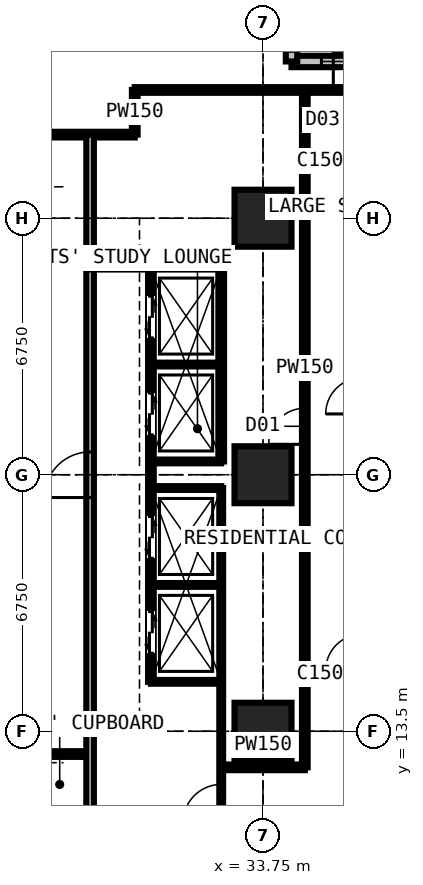
"""IFC4 building model, lengths in metres.
Left out: names, types, materials, properties, quantities, classifications, styles, units other than length and angle.
Written with IfcOpenShell. Run it as: python <this file> out.ifc"""

import sys

from ifc_helpers import new_model, si_unit, direction, frame, frame_2d, origin, origin_2d, place, context, subcontext, project, spatial, rectangle, extrude, element, fill, save


model = new_model("IFC4")
c1 = context("Model", 3, precision=1e-05, world=origin(), true_north=direction((0.0, 1.0)))
c2 = subcontext(c1, "Body", "Model", "MODEL_VIEW")
j1 = project(units=[si_unit("LENGTHUNIT", "METRE"), si_unit("PLANEANGLEUNIT", "RADIAN")], contexts=[c1])
p1 = place(None, origin())
s1 = spatial("IfcSite", under=j1, at=p1, CompositionType="ELEMENT")
p2 = place(p1, origin())
s2 = spatial("IfcBuilding", under=s1, at=p2, CompositionType="ELEMENT")
p3 = place(p2, frame((0.0, 0.0, 116.1)))
s3 = spatial("IfcBuildingStorey", under=s2, at=p3, CompositionType="ELEMENT", Elevation=116.1)
for number, where, z_axis, x_axis in (
    (1, (33.75, 13.5, 0.0), (0.0, 0.0, 1.0), (1.0, 0.0, 0.0)),
    (2, (33.75, 20.25, 0.0), (0.0, 0.0, 1.0), (1.0, 0.0, 0.0)),
    (3, (33.75, 27.0, 0.0), (0.0, 0.0, 1.0), (1.0, 0.0, 0.0)),
):
    element("IfcColumn", number, at=place(p3, frame(where, z_axis=z_axis, x_axis=x_axis)), inside=s3, PredefinedType="COLUMN", context=c2, shape_type="SweptSolid", body=[
        extrude(rectangle(XDim=1.5, YDim=1.5, at=origin_2d()), origin(), (0.0, 0.0, 1.0), 3.6),
    ])
p4 = place(p3, frame((37.875, 31.125, 0.0), z_axis=(0.0, 0.0, 1.0), x_axis=(-1.0, 0.0, 0.0)))
e4 = element("IfcWall", 4, at=p4, inside=s3, PredefinedType="SOLIDWALL", context=c2, shape_type="SweptSolid", body=[
    extrude(rectangle(XDim=3.375, YDim=0.3, at=frame_2d((1.688, 0.0))), origin(), (0.0, 0.0, 1.0), 3.375),
])
p5 = place(p4, frame((0.788, 0.0, 0.6)))
e5 = element("IfcOpeningElement", 5, at=p5, cuts=e4, PredefinedType="OPENING", context=c2, shape_type="SweptSolid", body=[
    extrude(rectangle(XDim=1.8, YDim=2.1, at=frame_2d((0.9, 1.05))), frame((0.0, 0.16, 0.0), z_axis=(0.0, -1.0, 0.0), x_axis=(1.0, 0.0, 0.0)), (0.0, 0.0, 1.0), 0.32),
])
p6 = place(p3, frame((34.5, 31.125, 0.0), z_axis=(0.0, 0.0, 1.0), x_axis=(0.0, 1.0, 0.0)))
e6 = element("IfcWall", 6, at=p6, inside=s3, PredefinedType="SOLIDWALL", context=c2, shape_type="SweptSolid", body=[
    extrude(rectangle(XDim=3.375, YDim=0.3, at=frame_2d((1.688, 0.0))), origin(), (0.0, 0.0, 1.0), 3.375),
])
p7 = place(p6, frame((0.268, 0.0, 0.9)))
e7 = element("IfcOpeningElement", 7, at=p7, cuts=e6, PredefinedType="OPENING", context=c2, shape_type="SweptSolid", body=[
    extrude(rectangle(XDim=1.5, YDim=1.8, at=frame_2d((0.75, 0.9))), frame((0.0, 0.16, 0.0), z_axis=(0.0, -1.0, 0.0), x_axis=(1.0, 0.0, 0.0)), (0.0, 0.0, 1.0), 0.32),
])
p8 = place(p3, frame((11.3, 29.2, 0.0), z_axis=(0.0, 0.0, 1.0), x_axis=(1.0, 0.0, 0.0)))
e8 = element("IfcWall", 8, at=p8, inside=s3, PredefinedType="PARTITIONING", context=c2, shape_type="SweptSolid", body=[
    extrude(rectangle(XDim=19.075, YDim=0.15, at=frame_2d((9.538, 0.0))), origin(), (0.0, 0.0, 1.0), 3.375),
])
p9 = place(p8, frame((5.825, 0.0, 0.0)))
e9 = element("IfcOpeningElement", 9, at=p9, cuts=e8, PredefinedType="OPENING", context=c2, shape_type="SweptSolid", body=[
    extrude(rectangle(XDim=0.95, YDim=2.2, at=frame_2d((0.475, 1.1))), frame((0.0, 0.085, 0.0), z_axis=(0.0, -1.0, 0.0), x_axis=(1.0, 0.0, 0.0)), (0.0, 0.0, 1.0), 0.17),
])
p10 = place(p8, frame((9.2, 0.0, 0.0)))
e10 = element("IfcOpeningElement", 10, at=p10, cuts=e8, PredefinedType="OPENING", context=c2, shape_type="SweptSolid", body=[
    extrude(rectangle(XDim=0.95, YDim=2.2, at=frame_2d((0.475, 1.1))), frame((0.0, 0.085, 0.0), z_axis=(0.0, -1.0, 0.0), x_axis=(1.0, 0.0, 0.0)), (0.0, 0.0, 1.0), 0.17),
])
p11 = place(p8, frame((0.6, 0.0, 0.0)))
e11 = element("IfcOpeningElement", 11, at=p11, cuts=e8, PredefinedType="OPENING", context=c2, shape_type="SweptSolid", body=[
    extrude(rectangle(XDim=1.0, YDim=2.2, at=frame_2d((0.5, 1.1))), frame((0.0, 0.085, 0.0), z_axis=(0.0, -1.0, 0.0), x_axis=(1.0, 0.0, 0.0)), (0.0, 0.0, 1.0), 0.17),
])
p12 = place(p3, frame((27.6, 12.9, 0.0), z_axis=(0.0, 0.0, 1.0), x_axis=(1.0, 0.0, 0.0)))
e12 = element("IfcWall", 12, at=p12, inside=s3, PredefinedType="PARTITIONING", context=c2, shape_type="SweptSolid", body=[
    extrude(rectangle(XDim=1.6, YDim=0.15, at=frame_2d((0.8, 0.0))), origin(), (0.0, 0.0, 1.0), 2.806),
])
p13 = place(p3, frame((29.2, 11.3, 0.0), z_axis=(0.0, 0.0, 1.0), x_axis=(0.0, 1.0, 0.0)))
e13 = element("IfcWall", 13, at=p13, inside=s3, PredefinedType="PARTITIONING", context=c2, shape_type="SweptSolid", body=[
    extrude(rectangle(XDim=17.9, YDim=0.2, at=frame_2d((8.95, 0.0))), origin(), (0.0, 0.0, 1.0), 3.375),
])
p14 = place(p13, frame((8.35, 0.0, 0.0)))
e14 = element("IfcOpeningElement", 14, at=p14, cuts=e13, PredefinedType="OPENING", context=c2, shape_type="SweptSolid", body=[
    extrude(rectangle(XDim=1.2, YDim=2.2, at=frame_2d((0.6, 1.1))), frame((0.0, 0.11, 0.0), z_axis=(0.0, -1.0, 0.0), x_axis=(1.0, 0.0, 0.0)), (0.0, 0.0, 1.0), 0.22),
])
p15 = place(p3, frame((29.2, 25.7, 0.0), z_axis=(0.0, 0.0, 1.0), x_axis=(1.0, 0.0, 0.0)))
e15 = element("IfcWall", 15, at=p15, inside=s3, PredefinedType="SHEAR", context=c2, shape_type="SweptSolid", body=[
    extrude(rectangle(XDim=3.45, YDim=0.1, at=frame_2d((1.725, 0.0))), origin(), (0.0, 0.0, 1.0), 3.375),
])
p16 = place(p3, frame((30.375, 29.2, 0.0), z_axis=(0.0, 0.0, 1.0), x_axis=(0.0, 1.0, 0.0)))
e16 = element("IfcWall", 16, at=p16, inside=s3, PredefinedType="PARTITIONING", context=c2, shape_type="SweptSolid", body=[
    extrude(rectangle(XDim=1.175, YDim=0.15, at=frame_2d((0.587, 0.0))), origin(), (0.0, 0.0, 1.0), 3.375),
])
p17 = place(p3, frame((30.375, 30.375, 0.0), z_axis=(0.0, 0.0, 1.0), x_axis=(1.0, 0.0, 0.0)))
e17 = element("IfcWall", 17, at=p17, inside=s3, PredefinedType="PARTITIONING", context=c2, shape_type="SweptSolid", body=[
    extrude(rectangle(XDim=7.35, YDim=0.15, at=frame_2d((3.675, 0.0))), origin(), (0.0, 0.0, 1.0), 2.877),
])
p18 = place(p17, frame((5.225, 0.0, 0.0)))
e18 = element("IfcOpeningElement", 18, at=p18, cuts=e17, PredefinedType="OPENING", context=c2, shape_type="SweptSolid", body=[
    extrude(rectangle(XDim=1.0, YDim=2.2, at=frame_2d((0.5, 1.1))), frame((0.0, 0.085, 0.0), z_axis=(0.0, -1.0, 0.0), x_axis=(1.0, 0.0, 0.0)), (0.0, 0.0, 1.0), 0.17),
])
p19 = place(p3, frame((30.8, 14.8, 0.0), z_axis=(0.0, 0.0, 1.0), x_axis=(0.0, 1.0, 0.0)))
e19 = element("IfcWall", 19, at=p19, inside=s3, PredefinedType="PARTITIONING", context=c2, shape_type="SweptSolid", body=[
    extrude(rectangle(XDim=10.9, YDim=0.15, at=frame_2d((5.45, 0.0))), origin(), (0.0, 0.0, 1.0), 3.375),
])
p20 = place(p19, frame((0.75, 0.0, 0.0)))
e20 = element("IfcOpeningElement", 20, at=p20, cuts=e19, PredefinedType="OPENING", context=c2, shape_type="SweptSolid", body=[
    extrude(rectangle(XDim=1.1, YDim=2.2, at=frame_2d((0.55, 1.1))), frame((0.0, 0.085, 0.0), z_axis=(0.0, -1.0, 0.0), x_axis=(1.0, 0.0, 0.0)), (0.0, 0.0, 1.0), 0.17),
])
p21 = place(p19, frame((3.25, 0.0, 0.0)))
e21 = element("IfcOpeningElement", 21, at=p21, cuts=e19, PredefinedType="OPENING", context=c2, shape_type="SweptSolid", body=[
    extrude(rectangle(XDim=1.1, YDim=2.2, at=frame_2d((0.55, 1.1))), frame((0.0, 0.085, 0.0), z_axis=(0.0, -1.0, 0.0), x_axis=(1.0, 0.0, 0.0)), (0.0, 0.0, 1.0), 0.17),
])
p22 = place(p19, frame((6.5, 0.0, 0.0)))
e22 = element("IfcOpeningElement", 22, at=p22, cuts=e19, PredefinedType="OPENING", context=c2, shape_type="SweptSolid", body=[
    extrude(rectangle(XDim=1.1, YDim=2.2, at=frame_2d((0.55, 1.1))), frame((0.0, 0.085, 0.0), z_axis=(0.0, -1.0, 0.0), x_axis=(1.0, 0.0, 0.0)), (0.0, 0.0, 1.0), 0.17),
])
p23 = place(p19, frame((9.05, 0.0, 0.0)))
e23 = element("IfcOpeningElement", 23, at=p23, cuts=e19, PredefinedType="OPENING", context=c2, shape_type="SweptSolid", body=[
    extrude(rectangle(XDim=1.1, YDim=2.2, at=frame_2d((0.55, 1.1))), frame((0.0, 0.085, 0.0), z_axis=(0.0, -1.0, 0.0), x_axis=(1.0, 0.0, 0.0)), (0.0, 0.0, 1.0), 0.17),
])
for number, where, z_axis, x_axis in (
    (24, (30.8, 14.8, 0.0), (0.0, 0.0, 1.0), (1.0, 0.0, 0.0)),
    (25, (30.8, 17.35, 0.0), (0.0, 0.0, 1.0), (1.0, 0.0, 0.0)),
    (26, (30.8, 19.9, 0.0), (0.0, 0.0, 1.0), (1.0, 0.0, 0.0)),
    (27, (30.8, 20.6, 0.0), (0.0, 0.0, 1.0), (1.0, 0.0, 0.0)),
    (28, (30.8, 23.15, 0.0), (0.0, 0.0, 1.0), (1.0, 0.0, 0.0)),
):
    element("IfcWall", number, at=place(p3, frame(where, z_axis=z_axis, x_axis=x_axis)), inside=s3, PredefinedType="SHEAR", context=c2, shape_type="SweptSolid", body=[
        extrude(rectangle(XDim=1.85, YDim=0.1, at=frame_2d((0.925, 0.0))), origin(), (0.0, 0.0, 1.0), 3.375),
    ])
p24 = place(p3, frame((32.65, 10.6, 0.0), z_axis=(0.0, 0.0, 1.0), x_axis=(0.0, 1.0, 0.0)))
e29 = element("IfcWall", 29, at=p24, inside=s3, PredefinedType="SHEAR", context=c2, shape_type="SweptSolid", body=[
    extrude(rectangle(XDim=9.3, YDim=0.1, at=frame_2d((4.65, 0.0))), origin(), (0.0, 0.0, 1.0), 3.375),
])
p25 = place(p24, frame((0.5, 0.0, 0.0)))
e30 = element("IfcOpeningElement", 30, at=p25, cuts=e29, PredefinedType="OPENING", context=c2, shape_type="SweptSolid", body=[
    extrude(rectangle(XDim=1.0, YDim=2.2, at=frame_2d((0.5, 1.1))), frame((0.0, 0.06, 0.0), z_axis=(0.0, -1.0, 0.0), x_axis=(1.0, 0.0, 0.0)), (0.0, 0.0, 1.0), 0.12),
])
p26 = place(p3, frame((32.65, 12.55, 0.0), z_axis=(0.0, 0.0, 1.0), x_axis=(1.0, 0.0, 0.0)))
e31 = element("IfcWall", 31, at=p26, inside=s3, PredefinedType="PARTITIONING", context=c2, shape_type="SweptSolid", body=[
    extrude(rectangle(XDim=2.2, YDim=0.15, at=frame_2d((1.1, 0.0))), origin(), (0.0, 0.0, 1.0), 3.375),
])
p27 = place(p3, frame((32.65, 20.6, 0.0), z_axis=(0.0, 0.0, 1.0), x_axis=(0.0, 1.0, 0.0)))
e32 = element("IfcWall", 32, at=p27, inside=s3, PredefinedType="PARTITIONING", context=c2, shape_type="SweptSolid", body=[
    extrude(rectangle(XDim=5.1, YDim=0.15, at=frame_2d((2.55, 0.0))), origin(), (0.0, 0.0, 1.0), 3.375),
])
p28 = place(p3, frame((34.85, 12.55, 0.0), z_axis=(0.0, 0.0, 1.0), x_axis=(0.0, 1.0, 0.0)))
e33 = element("IfcWall", 33, at=p28, inside=s3, PredefinedType="PARTITIONING", context=c2, shape_type="SweptSolid", body=[
    extrude(rectangle(XDim=17.825, YDim=0.15, at=frame_2d((8.913, 0.0))), origin(), (0.0, 0.0, 1.0), 3.375),
])
p29 = place(p28, frame((8.5, 0.0, 0.0)))
e34 = element("IfcOpeningElement", 34, at=p29, cuts=e33, PredefinedType="OPENING", context=c2, shape_type="SweptSolid", body=[
    extrude(rectangle(XDim=0.95, YDim=2.2, at=frame_2d((0.475, 1.1))), frame((0.0, 0.085, 0.0), z_axis=(0.0, -1.0, 0.0), x_axis=(1.0, 0.0, 0.0)), (0.0, 0.0, 1.0), 0.17),
])
p30 = place(p5, origin())
e35 = element("IfcWindow", 35, at=p30, inside=s3, PartitioningType="SINGLE_PANEL", PredefinedType="WINDOW", context=c2, shape_type="SweptSolid", body=[
    extrude(rectangle(XDim=1.8, YDim=2.1, at=frame_2d((0.9, 1.05))), frame((0.0, 0.03, 0.0), z_axis=(0.0, -1.0, 0.0), x_axis=(1.0, 0.0, 0.0)), (0.0, 0.0, 1.0), 0.06),
])
fill(e5, e35)
p31 = place(p25, origin())
e36 = element("IfcDoor", 36, at=p31, inside=s3, OperationType="SINGLE_SWING_LEFT", PredefinedType="DOOR", context=c2, shape_type="SweptSolid", body=[
    extrude(rectangle(XDim=1.0, YDim=2.2, at=frame_2d((0.5, 1.1))), frame((0.0, 0.025, 0.0), z_axis=(0.0, -1.0, 0.0), x_axis=(1.0, 0.0, 0.0)), (0.0, 0.0, 1.0), 0.05),
])
fill(e30, e36)
p32 = place(p29, origin())
e37 = element("IfcDoor", 37, at=p32, inside=s3, OperationType="SINGLE_SWING_LEFT", PredefinedType="DOOR", context=c2, shape_type="SweptSolid", body=[
    extrude(rectangle(XDim=0.95, YDim=2.2, at=frame_2d((0.475, 1.1))), frame((0.0, 0.025, 0.0), z_axis=(0.0, -1.0, 0.0), x_axis=(1.0, 0.0, 0.0)), (0.0, 0.0, 1.0), 0.05),
])
fill(e34, e37)
p33 = place(p18, origin())
e38 = element("IfcDoor", 38, at=p33, inside=s3, OperationType="SINGLE_SWING_LEFT", PredefinedType="DOOR", context=c2, shape_type="SweptSolid", body=[
    extrude(rectangle(XDim=1.0, YDim=2.2, at=frame_2d((0.5, 1.1))), frame((0.0, 0.025, 0.0), z_axis=(0.0, -1.0, 0.0), x_axis=(1.0, 0.0, 0.0)), (0.0, 0.0, 1.0), 0.05),
])
fill(e18, e38)
p34 = place(p20, origin())
e39 = element("IfcDoor", 39, at=p34, inside=s3, OperationType="DOUBLE_DOOR_SLIDING", PredefinedType="DOOR", context=c2, shape_type="SweptSolid", body=[
    extrude(rectangle(XDim=1.1, YDim=2.2, at=frame_2d((0.55, 1.1))), frame((0.0, 0.025, 0.0), z_axis=(0.0, -1.0, 0.0), x_axis=(1.0, 0.0, 0.0)), (0.0, 0.0, 1.0), 0.05),
])
fill(e20, e39)
p35 = place(p21, origin())
e40 = element("IfcDoor", 40, at=p35, inside=s3, OperationType="DOUBLE_DOOR_SLIDING", PredefinedType="DOOR", context=c2, shape_type="SweptSolid", body=[
    extrude(rectangle(XDim=1.1, YDim=2.2, at=frame_2d((0.55, 1.1))), frame((0.0, 0.025, 0.0), z_axis=(0.0, -1.0, 0.0), x_axis=(1.0, 0.0, 0.0)), (0.0, 0.0, 1.0), 0.05),
])
fill(e21, e40)
p36 = place(p22, origin())
e41 = element("IfcDoor", 41, at=p36, inside=s3, OperationType="DOUBLE_DOOR_SLIDING", PredefinedType="DOOR", context=c2, shape_type="SweptSolid", body=[
    extrude(rectangle(XDim=1.1, YDim=2.2, at=frame_2d((0.55, 1.1))), frame((0.0, 0.025, 0.0), z_axis=(0.0, -1.0, 0.0), x_axis=(1.0, 0.0, 0.0)), (0.0, 0.0, 1.0), 0.05),
])
fill(e22, e41)
p37 = place(p23, origin())
e42 = element("IfcDoor", 42, at=p37, inside=s3, OperationType="DOUBLE_DOOR_SLIDING", PredefinedType="DOOR", context=c2, shape_type="SweptSolid", body=[
    extrude(rectangle(XDim=1.1, YDim=2.2, at=frame_2d((0.55, 1.1))), frame((0.0, 0.025, 0.0), z_axis=(0.0, -1.0, 0.0), x_axis=(1.0, 0.0, 0.0)), (0.0, 0.0, 1.0), 0.05),
])
fill(e23, e42)
p38 = place(p14, origin())
e43 = element("IfcDoor", 43, at=p38, inside=s3, OperationType="DOUBLE_DOOR_SINGLE_SWING", PredefinedType="DOOR", context=c2, shape_type="SweptSolid", body=[
    extrude(rectangle(XDim=1.2, YDim=2.2, at=frame_2d((0.6, 1.1))), frame((0.0, 0.025, 0.0), z_axis=(0.0, -1.0, 0.0), x_axis=(1.0, 0.0, 0.0)), (0.0, 0.0, 1.0), 0.05),
])
fill(e14, e43)
save(model, sys.argv[1])
